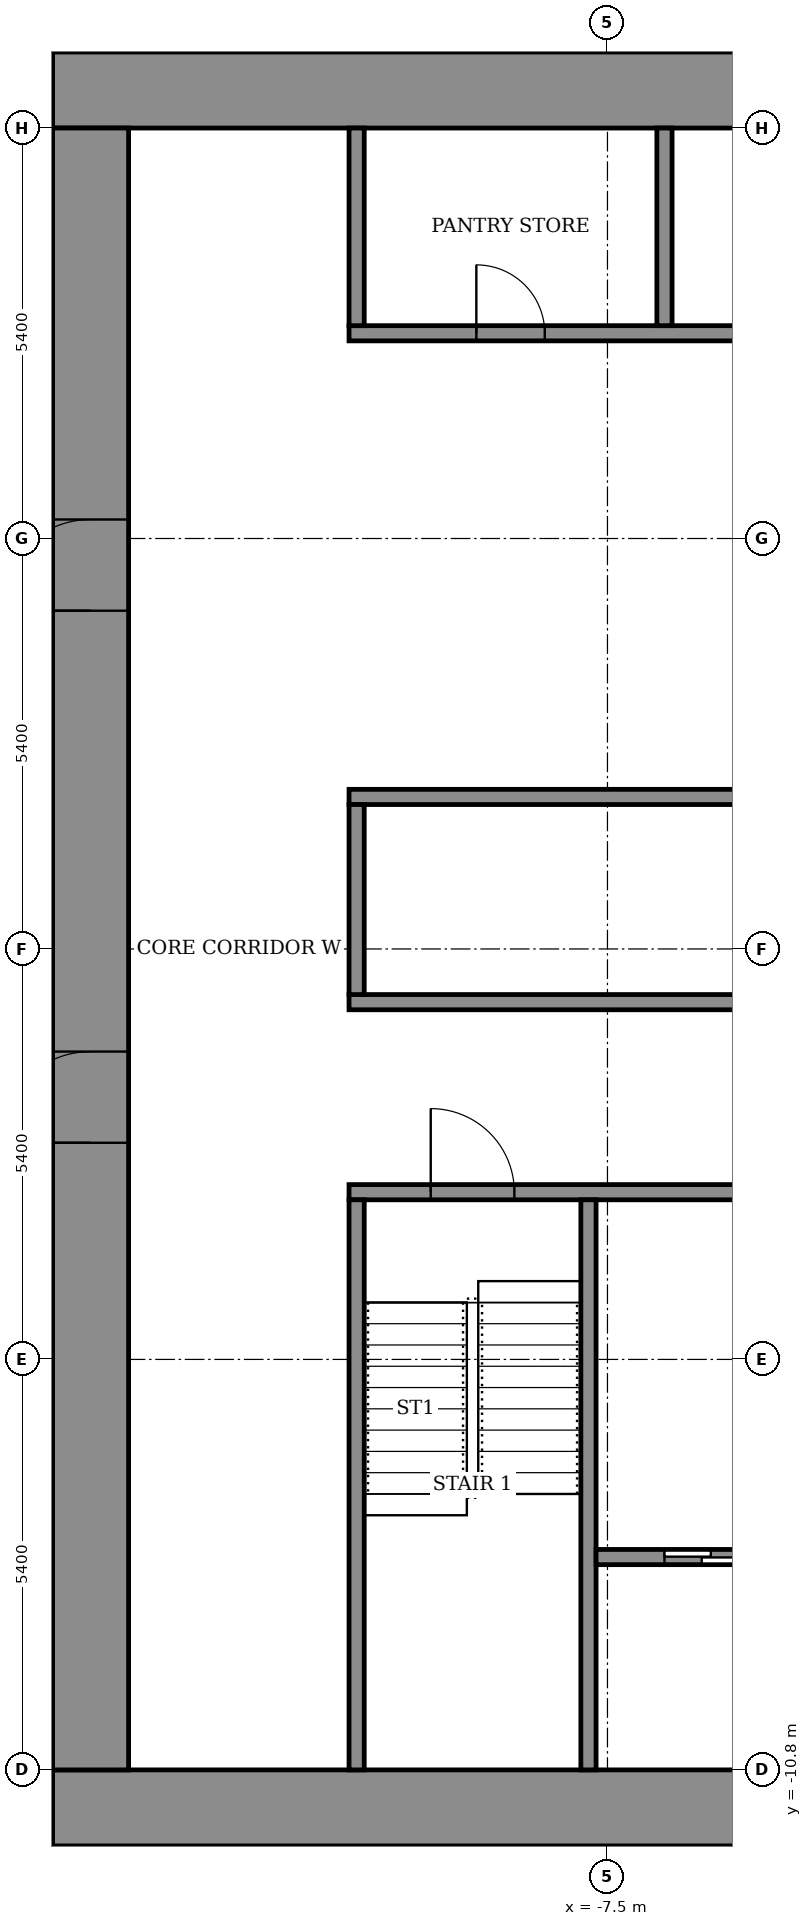
"""IFC4 building model, lengths in metres.
Left out: names, types, materials, properties, quantities, classifications, styles, units other than length and angle.
Written with IfcOpenShell. Run it as: python <this file> out.ifc"""

import sys

from ifc_helpers import new_model, si_unit, direction, frame, frame_2d, origin, place, context, subcontext, project, spatial, rectangle, extrude, element, fill, save


model = new_model("IFC4")
c1 = context("Model", 3, precision=1e-05, world=origin(), true_north=direction((0.0, 1.0)))
c2 = subcontext(c1, "Body", "Model", "MODEL_VIEW")
j1 = project(units=[si_unit("LENGTHUNIT", "METRE"), si_unit("PLANEANGLEUNIT", "RADIAN")], contexts=[c1])
p1 = place(None, origin())
s1 = spatial("IfcSite", under=j1, at=p1, CompositionType="ELEMENT")
p2 = place(p1, origin())
s2 = spatial("IfcBuilding", under=s1, at=p2, CompositionType="ELEMENT")
p3 = place(p2, frame((0.0, 0.0, 137.3)))
s3 = spatial("IfcBuildingStorey", under=s2, at=p3, CompositionType="ELEMENT", Elevation=137.3)
for number, where, z_axis, x_axis in (
    (1, (-14.8, -11.3, 0.0), (0.0, 0.0, 1.0), (1.0, 0.0, 0.0)),
    (2, (-14.8, 11.3, 0.0), (0.0, 0.0, 1.0), (1.0, 0.0, 0.0)),
):
    element("IfcWall", number, at=place(p3, frame(where, z_axis=z_axis, x_axis=x_axis)), inside=s3, PredefinedType="SHEAR", context=c2, shape_type="SweptSolid", body=[
        extrude(rectangle(XDim=29.6, YDim=1.0, at=frame_2d((14.8, 0.0))), origin(), (0.0, 0.0, 1.0), 3.6),
    ])
p4 = place(p3, frame((-14.3, -10.8, 0.0), z_axis=(0.0, 0.0, 1.0), x_axis=(0.0, 1.0, 0.0)))
e3 = element("IfcWall", 3, at=p4, inside=s3, PredefinedType="SHEAR", context=c2, shape_type="SweptSolid", body=[
    extrude(rectangle(XDim=21.6, YDim=1.0, at=frame_2d((10.8, 0.0))), origin(), (0.0, 0.0, 1.0), 3.6),
])
p5 = place(p4, frame((8.25, 0.0, 0.0)))
e4 = element("IfcOpeningElement", 4, at=p5, cuts=e3, PredefinedType="OPENING", context=c2, shape_type="SweptSolid", body=[
    extrude(rectangle(XDim=1.2, YDim=2.1, at=frame_2d((0.6, 1.05))), frame((0.0, 0.51, 0.0), z_axis=(0.0, -1.0, 0.0), x_axis=(1.0, 0.0, 0.0)), (0.0, 0.0, 1.0), 1.02),
])
p6 = place(p4, frame((15.25, 0.0, 0.0)))
e5 = element("IfcOpeningElement", 5, at=p6, cuts=e3, PredefinedType="OPENING", context=c2, shape_type="SweptSolid", body=[
    extrude(rectangle(XDim=1.2, YDim=2.1, at=frame_2d((0.6, 1.05))), frame((0.0, 0.51, 0.0), z_axis=(0.0, -1.0, 0.0), x_axis=(1.0, 0.0, 0.0)), (0.0, 0.0, 1.0), 1.02),
])
p7 = place(p3, frame((-10.9, -3.2, 0.0), z_axis=(0.0, 0.0, 1.0), x_axis=(1.0, 0.0, 0.0)))
e6 = element("IfcWall", 6, at=p7, inside=s3, PredefinedType="SHEAR", context=c2, shape_type="SweptSolid", body=[
    extrude(rectangle(XDim=21.8, YDim=0.2, at=frame_2d((10.9, 0.0))), origin(), (0.0, 0.0, 1.0), 3.05),
])
p8 = place(p7, frame((1.075, 0.0, 0.0)))
e7 = element("IfcOpeningElement", 7, at=p8, cuts=e6, PredefinedType="OPENING", context=c2, shape_type="SweptSolid", body=[
    extrude(rectangle(XDim=1.1, YDim=2.1, at=frame_2d((0.55, 1.05))), frame((0.0, 0.11, 0.0), z_axis=(0.0, -1.0, 0.0), x_axis=(1.0, 0.0, 0.0)), (0.0, 0.0, 1.0), 0.22),
])
p9 = place(p7, frame((10.325, 0.0, 0.0)))
e8 = element("IfcOpeningElement", 8, at=p9, cuts=e6, PredefinedType="OPENING", context=c2, shape_type="SweptSolid", body=[
    extrude(rectangle(XDim=1.1, YDim=2.1, at=frame_2d((0.55, 1.05))), frame((0.0, 0.11, 0.0), z_axis=(0.0, -1.0, 0.0), x_axis=(1.0, 0.0, 0.0)), (0.0, 0.0, 1.0), 0.22),
])
p10 = place(p7, frame((19.625, 0.0, 0.0)))
e9 = element("IfcOpeningElement", 9, at=p10, cuts=e6, PredefinedType="OPENING", context=c2, shape_type="SweptSolid", body=[
    extrude(rectangle(XDim=1.1, YDim=2.1, at=frame_2d((0.55, 1.05))), frame((0.0, 0.11, 0.0), z_axis=(0.0, -1.0, 0.0), x_axis=(1.0, 0.0, 0.0)), (0.0, 0.0, 1.0), 0.22),
])
p11 = place(p7, frame((5.7, 0.0, 0.0)))
e10 = element("IfcOpeningElement", 10, at=p11, cuts=e6, PredefinedType="OPENING", context=c2, shape_type="SweptSolid", body=[
    extrude(rectangle(XDim=1.1, YDim=2.1, at=frame_2d((0.55, 1.05))), frame((0.0, 0.11, 0.0), z_axis=(0.0, -1.0, 0.0), x_axis=(1.0, 0.0, 0.0)), (0.0, 0.0, 1.0), 0.22),
])
p12 = place(p7, frame((14.975, 0.0, 0.0)))
e11 = element("IfcOpeningElement", 11, at=p12, cuts=e6, PredefinedType="OPENING", context=c2, shape_type="SweptSolid", body=[
    extrude(rectangle(XDim=1.1, YDim=2.1, at=frame_2d((0.55, 1.05))), frame((0.0, 0.11, 0.0), z_axis=(0.0, -1.0, 0.0), x_axis=(1.0, 0.0, 0.0)), (0.0, 0.0, 1.0), 0.22),
])
p13 = place(p3, frame((-10.9, -0.7, 0.0), z_axis=(0.0, 0.0, 1.0), x_axis=(1.0, 0.0, 0.0)))
e12 = element("IfcWall", 12, at=p13, inside=s3, PredefinedType="SHEAR", context=c2, shape_type="SweptSolid", body=[
    extrude(rectangle(XDim=21.8, YDim=0.2, at=frame_2d((10.9, 0.0))), origin(), (0.0, 0.0, 1.0), 3.05),
])
p14 = place(p3, frame((-10.9, 2.0, 0.0), z_axis=(0.0, 0.0, 1.0), x_axis=(1.0, 0.0, 0.0)))
e13 = element("IfcWall", 13, at=p14, inside=s3, PredefinedType="SHEAR", context=c2, shape_type="SweptSolid", body=[
    extrude(rectangle(XDim=21.8, YDim=0.2, at=frame_2d((10.9, 0.0))), origin(), (0.0, 0.0, 1.0), 3.05),
])
p15 = place(p14, frame((14.4, 0.0, 0.0)))
e14 = element("IfcOpeningElement", 14, at=p15, cuts=e13, PredefinedType="OPENING", context=c2, shape_type="SweptSolid", body=[
    extrude(rectangle(XDim=1.1, YDim=2.1, at=frame_2d((0.55, 1.05))), frame((0.0, 0.11, 0.0), z_axis=(0.0, -1.0, 0.0), x_axis=(1.0, 0.0, 0.0)), (0.0, 0.0, 1.0), 0.22),
])
p16 = place(p14, frame((17.1, 0.0, 0.0)))
e15 = element("IfcOpeningElement", 15, at=p16, cuts=e13, PredefinedType="OPENING", context=c2, shape_type="SweptSolid", body=[
    extrude(rectangle(XDim=1.1, YDim=2.1, at=frame_2d((0.55, 1.05))), frame((0.0, 0.11, 0.0), z_axis=(0.0, -1.0, 0.0), x_axis=(1.0, 0.0, 0.0)), (0.0, 0.0, 1.0), 0.22),
])
p17 = place(p14, frame((19.8, 0.0, 0.0)))
e16 = element("IfcOpeningElement", 16, at=p17, cuts=e13, PredefinedType="OPENING", context=c2, shape_type="SweptSolid", body=[
    extrude(rectangle(XDim=1.1, YDim=2.1, at=frame_2d((0.55, 1.05))), frame((0.0, 0.11, 0.0), z_axis=(0.0, -1.0, 0.0), x_axis=(1.0, 0.0, 0.0)), (0.0, 0.0, 1.0), 0.22),
])
p18 = place(p14, frame((6.4, 0.0, 0.0)))
e17 = element("IfcOpeningElement", 17, at=p18, cuts=e13, PredefinedType="OPENING", context=c2, shape_type="SweptSolid", body=[
    extrude(rectangle(XDim=0.9, YDim=2.1, at=frame_2d((0.45, 1.05))), frame((0.0, 0.11, 0.0), z_axis=(0.0, -1.0, 0.0), x_axis=(1.0, 0.0, 0.0)), (0.0, 0.0, 1.0), 0.22),
])
p19 = place(p3, frame((-10.9, 8.1, 0.0), z_axis=(0.0, 0.0, 1.0), x_axis=(1.0, 0.0, 0.0)))
e18 = element("IfcWall", 18, at=p19, inside=s3, PredefinedType="SHEAR", context=c2, shape_type="SweptSolid", body=[
    extrude(rectangle(XDim=21.8, YDim=0.2, at=frame_2d((10.9, 0.0))), origin(), (0.0, 0.0, 1.0), 3.05),
])
p20 = place(p19, frame((14.4, 0.0, 0.0)))
e19 = element("IfcOpeningElement", 19, at=p20, cuts=e18, PredefinedType="OPENING", context=c2, shape_type="SweptSolid", body=[
    extrude(rectangle(XDim=1.1, YDim=2.1, at=frame_2d((0.55, 1.05))), frame((0.0, 0.11, 0.0), z_axis=(0.0, -1.0, 0.0), x_axis=(1.0, 0.0, 0.0)), (0.0, 0.0, 1.0), 0.22),
])
p21 = place(p19, frame((17.1, 0.0, 0.0)))
e20 = element("IfcOpeningElement", 20, at=p21, cuts=e18, PredefinedType="OPENING", context=c2, shape_type="SweptSolid", body=[
    extrude(rectangle(XDim=1.1, YDim=2.1, at=frame_2d((0.55, 1.05))), frame((0.0, 0.11, 0.0), z_axis=(0.0, -1.0, 0.0), x_axis=(1.0, 0.0, 0.0)), (0.0, 0.0, 1.0), 0.22),
])
p22 = place(p19, frame((19.8, 0.0, 0.0)))
e21 = element("IfcOpeningElement", 21, at=p22, cuts=e18, PredefinedType="OPENING", context=c2, shape_type="SweptSolid", body=[
    extrude(rectangle(XDim=1.1, YDim=2.1, at=frame_2d((0.55, 1.05))), frame((0.0, 0.11, 0.0), z_axis=(0.0, -1.0, 0.0), x_axis=(1.0, 0.0, 0.0)), (0.0, 0.0, 1.0), 0.22),
])
p23 = place(p19, frame((1.675, 0.0, 0.0)))
e22 = element("IfcOpeningElement", 22, at=p23, cuts=e18, PredefinedType="OPENING", context=c2, shape_type="SweptSolid", body=[
    extrude(rectangle(XDim=0.9, YDim=2.1, at=frame_2d((0.45, 1.05))), frame((0.0, 0.11, 0.0), z_axis=(0.0, -1.0, 0.0), x_axis=(1.0, 0.0, 0.0)), (0.0, 0.0, 1.0), 0.22),
])
p24 = place(p19, frame((8.425, 0.0, 0.0)))
e23 = element("IfcOpeningElement", 23, at=p24, cuts=e18, PredefinedType="OPENING", context=c2, shape_type="SweptSolid", body=[
    extrude(rectangle(XDim=0.9, YDim=2.1, at=frame_2d((0.45, 1.05))), frame((0.0, 0.11, 0.0), z_axis=(0.0, -1.0, 0.0), x_axis=(1.0, 0.0, 0.0)), (0.0, 0.0, 1.0), 0.22),
])
for number, where, z_axis, x_axis in (
    (24, (-10.8, -10.8, 0.0), (0.0, 0.0, 1.0), (0.0, 1.0, 0.0)),
    (25, (-7.75, -10.8, 0.0), (0.0, 0.0, 1.0), (0.0, 1.0, 0.0)),
):
    element("IfcWall", number, at=place(p3, frame(where, z_axis=z_axis, x_axis=x_axis)), inside=s3, PredefinedType="SHEAR", context=c2, shape_type="SweptSolid", body=[
        extrude(rectangle(XDim=7.5, YDim=0.2, at=frame_2d((3.75, 0.0))), origin(), (0.0, 0.0, 1.0), 3.05),
    ])
p25 = place(p3, frame((-7.65, -8.0, 0.0), z_axis=(0.0, 0.0, 1.0), x_axis=(1.0, 0.0, 0.0)))
e26 = element("IfcWall", 26, at=p25, inside=s3, PredefinedType="SHEAR", context=c2, shape_type="SweptSolid", body=[
    extrude(rectangle(XDim=6.0, YDim=0.2, at=frame_2d((3.0, 0.0))), origin(), (0.0, 0.0, 1.0), 3.05),
])
p26 = place(p25, frame((0.9, 0.0, 0.0)))
e27 = element("IfcOpeningElement", 27, at=p26, cuts=e26, PredefinedType="OPENING", context=c2, shape_type="SweptSolid", body=[
    extrude(rectangle(XDim=1.1, YDim=2.1, at=frame_2d((0.55, 1.05))), frame((0.0, 0.11, 0.0), z_axis=(0.0, -1.0, 0.0), x_axis=(1.0, 0.0, 0.0)), (0.0, 0.0, 1.0), 0.22),
])
p27 = place(p25, frame((4.0, 0.0, 0.0)))
e28 = element("IfcOpeningElement", 28, at=p27, cuts=e26, PredefinedType="OPENING", context=c2, shape_type="SweptSolid", body=[
    extrude(rectangle(XDim=1.1, YDim=2.1, at=frame_2d((0.55, 1.05))), frame((0.0, 0.11, 0.0), z_axis=(0.0, -1.0, 0.0), x_axis=(1.0, 0.0, 0.0)), (0.0, 0.0, 1.0), 0.22),
])
p28 = place(p3, frame((-10.8, -0.6, 0.0), z_axis=(0.0, 0.0, 1.0), x_axis=(0.0, 1.0, 0.0)))
e29 = element("IfcWall", 29, at=p28, inside=s3, PredefinedType="STANDARD", context=c2, shape_type="SweptSolid", body=[
    extrude(rectangle(XDim=2.5, YDim=0.2, at=frame_2d((1.25, 0.0))), origin(), (0.0, 0.0, 1.0), 3.05),
])
for number, where, z_axis, x_axis in (
    (30, (-10.8, 8.2, 0.0), (0.0, 0.0, 1.0), (0.0, 1.0, 0.0)),
    (31, (-6.75, 8.2, 0.0), (0.0, 0.0, 1.0), (0.0, 1.0, 0.0)),
):
    element("IfcWall", number, at=place(p3, frame(where, z_axis=z_axis, x_axis=x_axis)), inside=s3, PredefinedType="STANDARD", context=c2, shape_type="SweptSolid", body=[
        extrude(rectangle(XDim=2.6, YDim=0.2, at=frame_2d((1.3, 0.0))), origin(), (0.0, 0.0, 1.0), 3.05),
    ])
p29 = place(p5, origin())
e32 = element("IfcDoor", 32, at=p29, inside=s3, OperationType="DOUBLE_DOOR_SINGLE_SWING", PredefinedType="DOOR", context=c2, shape_type="SweptSolid", body=[
    extrude(rectangle(XDim=1.2, YDim=2.1, at=frame_2d((0.6, 1.05))), frame((0.0, 0.025, 0.0), z_axis=(0.0, -1.0, 0.0), x_axis=(1.0, 0.0, 0.0)), (0.0, 0.0, 1.0), 0.05),
])
fill(e4, e32)
p30 = place(p6, origin())
e33 = element("IfcDoor", 33, at=p30, inside=s3, OperationType="DOUBLE_DOOR_SINGLE_SWING", PredefinedType="DOOR", context=c2, shape_type="SweptSolid", body=[
    extrude(rectangle(XDim=1.2, YDim=2.1, at=frame_2d((0.6, 1.05))), frame((0.0, 0.025, 0.0), z_axis=(0.0, -1.0, 0.0), x_axis=(1.0, 0.0, 0.0)), (0.0, 0.0, 1.0), 0.05),
])
fill(e5, e33)
p31 = place(p23, origin())
e34 = element("IfcDoor", 34, at=p31, inside=s3, OperationType="SINGLE_SWING_RIGHT", PredefinedType="DOOR", context=c2, shape_type="SweptSolid", body=[
    extrude(rectangle(XDim=0.9, YDim=2.1, at=frame_2d((0.45, 1.05))), frame((0.0, 0.025, 0.0), z_axis=(0.0, -1.0, 0.0), x_axis=(1.0, 0.0, 0.0)), (0.0, 0.0, 1.0), 0.05),
])
fill(e22, e34)
p32 = place(p26, origin())
e35 = element("IfcDoor", 35, at=p32, inside=s3, OperationType="SLIDING_TO_LEFT", PredefinedType="DOOR", context=c2, shape_type="SweptSolid", body=[
    extrude(rectangle(XDim=1.1, YDim=2.1, at=frame_2d((0.55, 1.05))), frame((0.0, 0.025, 0.0), z_axis=(0.0, -1.0, 0.0), x_axis=(1.0, 0.0, 0.0)), (0.0, 0.0, 1.0), 0.05),
])
fill(e27, e35)
p33 = place(p8, origin())
e36 = element("IfcDoor", 36, at=p33, inside=s3, OperationType="SINGLE_SWING_RIGHT", PredefinedType="DOOR", context=c2, shape_type="SweptSolid", body=[
    extrude(rectangle(XDim=1.1, YDim=2.1, at=frame_2d((0.55, 1.05))), frame((0.0, 0.025, 0.0), z_axis=(0.0, -1.0, 0.0), x_axis=(1.0, 0.0, 0.0)), (0.0, 0.0, 1.0), 0.05),
])
fill(e7, e36)
save(model, sys.argv[1])
